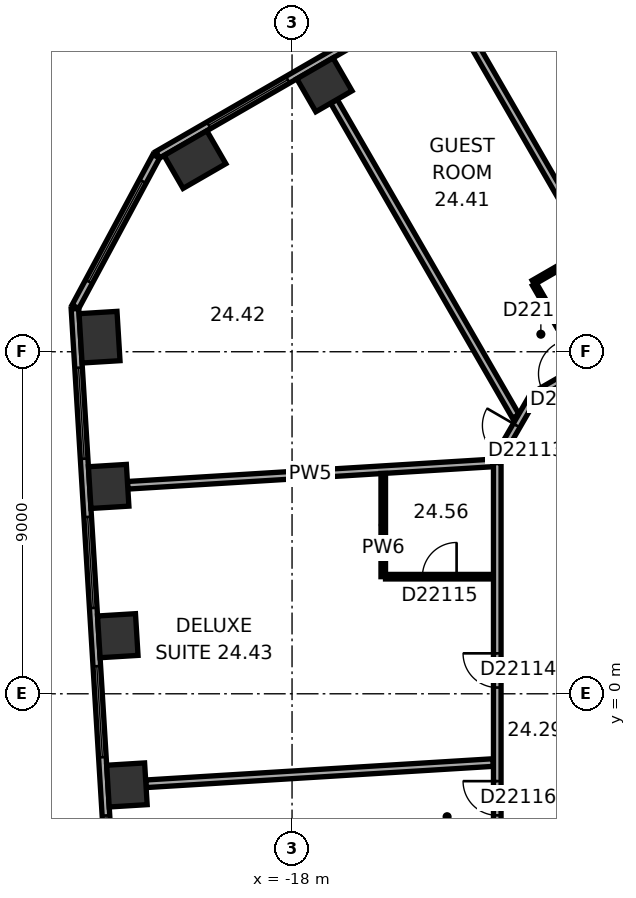
"""IFC4 building model, lengths in metres.
Left out: names, types, materials, properties, quantities, classifications, styles, units other than length and angle.
Written with IfcOpenShell. Run it as: python <this file> out.ifc"""

import sys

from ifc_helpers import new_model, si_unit, direction, frame, frame_2d, origin, origin_2d, place, context, subcontext, project, spatial, rectangle, extrude, element, fill, save


model = new_model("IFC4")
c1 = context("Model", 3, precision=1e-05, world=origin(), true_north=direction((0.0, 1.0)))
c2 = subcontext(c1, "Body", "Model", "MODEL_VIEW")
j1 = project(units=[si_unit("LENGTHUNIT", "METRE"), si_unit("PLANEANGLEUNIT", "RADIAN")], contexts=[c1])
p1 = place(None, origin())
s1 = spatial("IfcSite", under=j1, at=p1, CompositionType="ELEMENT")
p2 = place(p1, origin())
s2 = spatial("IfcBuilding", under=s1, at=p2, CompositionType="ELEMENT")
p3 = place(p2, frame((0.0, 0.0, 103.4)))
s3 = spatial("IfcBuildingStorey", under=s2, at=p3, CompositionType="ELEMENT", Elevation=103.4)
p4 = place(p3, frame((-17.148, 16.023, 0.0), z_axis=(0.0, 0.0, 1.0), x_axis=(-0.866025403784, -0.5, 0.0)))
e1 = element("IfcColumn", 1, at=p4, inside=s3, PredefinedType="COLUMN", context=c2, shape_type="SweptSolid", body=[
    extrude(rectangle(XDim=1.1, YDim=1.0, at=origin_2d()), origin(), (0.0, 0.0, 1.0), 3.3),
])
for number, where, z_axis, x_axis in (
    (2, (-20.555, 14.055, 0.0), (0.0, 0.0, 1.0), (-0.866, -0.5, 0.0)),
    (3, (-23.066, 9.383, 0.0), (0.0, 0.0, 1.0), (0.061, -0.998, 0.0)),
):
    element("IfcColumn", number, at=place(p3, frame(where, z_axis=z_axis, x_axis=x_axis)), inside=s3, PredefinedType="COLUMN", context=c2, shape_type="SweptSolid", body=[
        extrude(rectangle(XDim=1.3, YDim=1.0, at=origin_2d()), origin(), (0.0, 0.0, 1.0), 3.3),
    ])
for number, where, z_axis, x_axis in (
    (4, (-22.826, 5.456, 0.0), (0.0, 0.0, 1.0), (0.061, -0.998, 0.0)),
    (5, (-22.585, 1.529, 0.0), (0.0, 0.0, 1.0), (0.061, -0.998, 0.0)),
    (6, (-22.345, -2.399, 0.0), (0.0, 0.0, 1.0), (0.061, -0.998, 0.0)),
):
    element("IfcColumn", number, at=place(p3, frame(where, z_axis=z_axis, x_axis=x_axis)), inside=s3, PredefinedType="COLUMN", context=c2, shape_type="SweptSolid", body=[
        extrude(rectangle(XDim=1.1, YDim=1.0, at=origin_2d()), origin(), (0.0, 0.0, 1.0), 3.3),
    ])
p5 = place(p3, frame((-3.136, 24.805, 0.0), z_axis=(0.0, 0.0, 1.0), x_axis=(-0.866028291626, -0.499994998079, 0.0)))
e7 = element("IfcWall", 7, at=p5, inside=s3, PredefinedType="STANDARD", context=c2, shape_type="SweptSolid", body=[
    extrude(rectangle(XDim=21.246, YDim=0.2, at=frame_2d((10.623, 0.0))), origin(), (0.0, 0.0, 1.0), 3.3),
])
p6 = place(p5, frame((1.555, 0.0, 0.8)))
e8 = element("IfcOpeningElement", 8, at=p6, cuts=e7, PredefinedType="OPENING", context=c2, shape_type="SweptSolid", body=[
    extrude(rectangle(XDim=2.4, YDim=1.7, at=frame_2d((1.2, 0.85))), frame((0.0, 0.11, 0.0), z_axis=(0.0, -1.0, 0.0), x_axis=(1.0, 0.0, 0.0)), (0.0, 0.0, 1.0), 0.22),
])
p7 = place(p5, frame((5.489, 0.0, 0.8)))
e9 = element("IfcOpeningElement", 9, at=p7, cuts=e7, PredefinedType="OPENING", context=c2, shape_type="SweptSolid", body=[
    extrude(rectangle(XDim=2.4, YDim=1.7, at=frame_2d((1.2, 0.85))), frame((0.0, 0.11, 0.0), z_axis=(0.0, -1.0, 0.0), x_axis=(1.0, 0.0, 0.0)), (0.0, 0.0, 1.0), 0.22),
])
p8 = place(p5, frame((9.424, 0.0, 0.8)))
e10 = element("IfcOpeningElement", 10, at=p8, cuts=e7, PredefinedType="OPENING", context=c2, shape_type="SweptSolid", body=[
    extrude(rectangle(XDim=2.4, YDim=1.7, at=frame_2d((1.2, 0.85))), frame((0.0, 0.11, 0.0), z_axis=(0.0, -1.0, 0.0), x_axis=(1.0, 0.0, 0.0)), (0.0, 0.0, 1.0), 0.22),
])
p9 = place(p5, frame((13.358, 0.0, 0.8)))
e11 = element("IfcOpeningElement", 11, at=p9, cuts=e7, PredefinedType="OPENING", context=c2, shape_type="SweptSolid", body=[
    extrude(rectangle(XDim=2.4, YDim=1.7, at=frame_2d((1.2, 0.85))), frame((0.0, 0.11, 0.0), z_axis=(0.0, -1.0, 0.0), x_axis=(1.0, 0.0, 0.0)), (0.0, 0.0, 1.0), 0.22),
])
p10 = place(p5, frame((17.293, 0.0, 0.8)))
e12 = element("IfcOpeningElement", 12, at=p10, cuts=e7, PredefinedType="OPENING", context=c2, shape_type="SweptSolid", body=[
    extrude(rectangle(XDim=2.4, YDim=1.7, at=frame_2d((1.2, 0.85))), frame((0.0, 0.11, 0.0), z_axis=(0.0, -1.0, 0.0), x_axis=(1.0, 0.0, 0.0)), (0.0, 0.0, 1.0), 0.22),
])
p11 = place(p3, frame((-21.574, 14.143, 0.0), z_axis=(0.0, 0.0, 1.0), x_axis=(-0.473292949472, -0.880905093628, 0.0)))
e13 = element("IfcWall", 13, at=p11, inside=s3, PredefinedType="STANDARD", context=c2, shape_type="SweptSolid", body=[
    extrude(rectangle(XDim=4.494, YDim=0.2, at=frame_2d((2.247, 0.0))), origin(), (0.0, 0.0, 1.0), 3.3),
])
p12 = place(p11, frame((0.747, 0.0, 0.8)))
e14 = element("IfcOpeningElement", 14, at=p12, cuts=e13, PredefinedType="OPENING", context=c2, shape_type="SweptSolid", body=[
    extrude(rectangle(XDim=3.0, YDim=1.7, at=frame_2d((1.5, 0.85))), frame((0.0, 0.11, 0.0), z_axis=(0.0, -1.0, 0.0), x_axis=(1.0, 0.0, 0.0)), (0.0, 0.0, 1.0), 0.22),
])
p13 = place(p3, frame((-23.713, 10.131, 0.0), z_axis=(0.0, 0.0, 1.0), x_axis=(0.061040439785, -0.998135293791, 0.0)))
e15 = element("IfcWall", 15, at=p13, inside=s3, PredefinedType="STANDARD", context=c2, shape_type="SweptSolid", body=[
    extrude(rectangle(XDim=21.246, YDim=0.2, at=frame_2d((10.623, 0.0))), origin(), (0.0, 0.0, 1.0), 3.3),
])
p14 = place(p13, frame((1.553, 0.0, 0.8)))
e16 = element("IfcOpeningElement", 16, at=p14, cuts=e15, PredefinedType="OPENING", context=c2, shape_type="SweptSolid", body=[
    extrude(rectangle(XDim=2.4, YDim=1.7, at=frame_2d((1.2, 0.85))), frame((0.0, 0.11, 0.0), z_axis=(0.0, -1.0, 0.0), x_axis=(1.0, 0.0, 0.0)), (0.0, 0.0, 1.0), 0.22),
])
p15 = place(p13, frame((5.488, 0.0, 0.8)))
e17 = element("IfcOpeningElement", 17, at=p15, cuts=e15, PredefinedType="OPENING", context=c2, shape_type="SweptSolid", body=[
    extrude(rectangle(XDim=2.4, YDim=1.7, at=frame_2d((1.2, 0.85))), frame((0.0, 0.11, 0.0), z_axis=(0.0, -1.0, 0.0), x_axis=(1.0, 0.0, 0.0)), (0.0, 0.0, 1.0), 0.22),
])
p16 = place(p13, frame((9.422, 0.0, 0.8)))
e18 = element("IfcOpeningElement", 18, at=p16, cuts=e15, PredefinedType="OPENING", context=c2, shape_type="SweptSolid", body=[
    extrude(rectangle(XDim=2.4, YDim=1.7, at=frame_2d((1.2, 0.85))), frame((0.0, 0.11, 0.0), z_axis=(0.0, -1.0, 0.0), x_axis=(1.0, 0.0, 0.0)), (0.0, 0.0, 1.0), 0.22),
])
p17 = place(p13, frame((13.357, 0.0, 0.8)))
e19 = element("IfcOpeningElement", 19, at=p17, cuts=e15, PredefinedType="OPENING", context=c2, shape_type="SweptSolid", body=[
    extrude(rectangle(XDim=2.4, YDim=1.7, at=frame_2d((1.2, 0.85))), frame((0.0, 0.11, 0.0), z_axis=(0.0, -1.0, 0.0), x_axis=(1.0, 0.0, 0.0)), (0.0, 0.0, 1.0), 0.22),
])
p18 = place(p13, frame((17.292, 0.0, 0.8)))
e20 = element("IfcOpeningElement", 20, at=p18, cuts=e15, PredefinedType="OPENING", context=c2, shape_type="SweptSolid", body=[
    extrude(rectangle(XDim=2.4, YDim=1.7, at=frame_2d((1.2, 0.85))), frame((0.0, 0.11, 0.0), z_axis=(0.0, -1.0, 0.0), x_axis=(1.0, 0.0, 0.0)), (0.0, 0.0, 1.0), 0.22),
])
p19 = place(p3, frame((-22.327, 5.486, 0.0), z_axis=(0.0, 0.0, 1.0), x_axis=(0.998135194863, 0.061042057435, 0.0)))
e21 = element("IfcWall", 21, at=p19, inside=s3, PredefinedType="PARTITIONING", context=c2, shape_type="SweptSolid", body=[
    extrude(rectangle(XDim=9.635, YDim=0.2, at=frame_2d((4.817, 0.0))), origin(), (0.0, 0.0, 1.0), 3.05),
])
p20 = place(p3, frame((-21.846, -2.368, 0.0), z_axis=(0.0, 0.0, 1.0), x_axis=(0.998134617584, 0.061051496129, 0.0)))
e22 = element("IfcWall", 22, at=p20, inside=s3, PredefinedType="PARTITIONING", context=c2, shape_type="SweptSolid", body=[
    extrude(rectangle(XDim=9.154, YDim=0.2, at=frame_2d((4.577, 0.0))), origin(), (0.0, 0.0, 1.0), 3.05),
])
p21 = place(p3, frame((-16.898, 15.59, 0.0), z_axis=(0.0, 0.0, 1.0), x_axis=(0.500023458698, -0.866011859475, 0.0)))
e23 = element("IfcWall", 23, at=p21, inside=s3, PredefinedType="PARTITIONING", context=c2, shape_type="SweptSolid", body=[
    extrude(rectangle(XDim=9.572, YDim=0.2, at=frame_2d((4.786, 0.0))), origin(), (0.0, 0.0, 1.0), 3.05),
])
p22 = place(p3, frame((-15.6, 3.081, 0.0), z_axis=(0.0, 0.0, 1.0), x_axis=(0.0, 1.0, 0.0)))
e24 = element("IfcWall", 24, at=p22, inside=s3, PredefinedType="PARTITIONING", context=c2, shape_type="SweptSolid", body=[
    extrude(rectangle(XDim=2.716, YDim=0.12, at=frame_2d((1.358, 0.0))), origin(), (0.0, 0.0, 1.0), 3.05),
])
p23 = place(p3, frame((-12.7, 3.081, 0.0), z_axis=(0.0, 0.0, 1.0), x_axis=(-1.0, 0.0, 0.0)))
e25 = element("IfcWall", 25, at=p23, inside=s3, PredefinedType="PARTITIONING", context=c2, shape_type="SweptSolid", body=[
    extrude(rectangle(XDim=2.84, YDim=0.12, at=frame_2d((1.42, 0.0))), origin(), (0.0, 0.0, 1.0), 3.05),
])
p24 = place(p23, frame((0.97, 0.0, 0.0)))
e26 = element("IfcOpeningElement", 26, at=p24, cuts=e25, PredefinedType="OPENING", context=c2, shape_type="SweptSolid", body=[
    extrude(rectangle(XDim=0.9, YDim=2.1, at=frame_2d((0.45, 1.05))), frame((0.0, 0.07, 0.0), z_axis=(0.0, -1.0, 0.0), x_axis=(1.0, 0.0, 0.0)), (0.0, 0.0, 1.0), 0.14),
])
p25 = place(p3, frame((-12.6, 6.081, 0.0), z_axis=(0.0, 0.0, 1.0), x_axis=(0.0, -1.0, 0.0)))
e27 = element("IfcWall", 27, at=p25, inside=s3, PredefinedType="PARTITIONING", context=c2, shape_type="SweptSolid", body=[
    extrude(rectangle(XDim=12.219, YDim=0.2, at=frame_2d((6.109, 0.0))), origin(), (0.0, 0.0, 1.0), 3.05),
])
p26 = place(p25, frame((5.017, 0.0, 0.0)))
e28 = element("IfcOpeningElement", 28, at=p26, cuts=e27, PredefinedType="OPENING", context=c2, shape_type="SweptSolid", body=[
    extrude(rectangle(XDim=0.9, YDim=2.1, at=frame_2d((0.45, 1.05))), frame((0.0, 0.11, 0.0), z_axis=(0.0, -1.0, 0.0), x_axis=(1.0, 0.0, 0.0)), (0.0, 0.0, 1.0), 0.22),
])
p27 = place(p25, frame((8.38, 0.0, 0.0)))
e29 = element("IfcOpeningElement", 29, at=p27, cuts=e27, PredefinedType="OPENING", context=c2, shape_type="SweptSolid", body=[
    extrude(rectangle(XDim=0.9, YDim=2.1, at=frame_2d((0.45, 1.05))), frame((0.0, 0.11, 0.0), z_axis=(0.0, -1.0, 0.0), x_axis=(1.0, 0.0, 0.0)), (0.0, 0.0, 1.0), 0.22),
])
p28 = place(p3, frame((-11.65, 7.823, 0.0), z_axis=(0.0, 0.0, 1.0), x_axis=(-0.500063520245, -0.865988727248, 0.0)))
e30 = element("IfcWall", 30, at=p28, inside=s3, PredefinedType="PARTITIONING", context=c2, shape_type="SweptSolid", body=[
    extrude(rectangle(XDim=1.9, YDim=0.2, at=frame_2d((0.95, 0.0))), origin(), (0.0, 0.0, 1.0), 3.05),
])
p29 = place(p28, frame((0.882, 0.0, 0.0)))
e31 = element("IfcOpeningElement", 31, at=p29, cuts=e30, PredefinedType="OPENING", context=c2, shape_type="SweptSolid", body=[
    extrude(rectangle(XDim=0.9, YDim=2.1, at=frame_2d((0.45, 1.05))), frame((0.0, 0.11, 0.0), z_axis=(0.0, -1.0, 0.0), x_axis=(1.0, 0.0, 0.0)), (0.0, 0.0, 1.0), 0.22),
])
p30 = place(p3, frame((-11.651, 10.825, 0.0), z_axis=(0.0, 0.0, 1.0), x_axis=(0.865998477143, 0.500046635412, 0.0)))
e32 = element("IfcWall", 32, at=p30, inside=s3, PredefinedType="PARTITIONING", context=c2, shape_type="SweptSolid", body=[
    extrude(rectangle(XDim=1.673, YDim=0.12, at=frame_2d((0.836, 0.0))), origin(), (0.0, 0.0, 1.0), 3.05),
])
p31 = place(p3, frame((-10.401, 8.66, 0.0), z_axis=(0.0, 0.0, 1.0), x_axis=(-0.500077547548, 0.865980627057, 0.0)))
e33 = element("IfcWall", 33, at=p31, inside=s3, PredefinedType="PARTITIONING", context=c2, shape_type="SweptSolid", body=[
    extrude(rectangle(XDim=2.44, YDim=0.12, at=frame_2d((1.22, 0.0))), origin(), (0.0, 0.0, 1.0), 3.05),
])
p32 = place(p31, frame((0.77, 0.0, 0.0)))
e34 = element("IfcOpeningElement", 34, at=p32, cuts=e33, PredefinedType="OPENING", context=c2, shape_type="SweptSolid", body=[
    extrude(rectangle(XDim=0.9, YDim=2.1, at=frame_2d((0.45, 1.05))), frame((0.0, 0.07, 0.0), z_axis=(0.0, -1.0, 0.0), x_axis=(1.0, 0.0, 0.0)), (0.0, 0.0, 1.0), 0.14),
])
p33 = place(p3, frame((-8.902, 9.41, 0.0), z_axis=(0.0, 0.0, 1.0), x_axis=(-0.866014299198, -0.500019233215, 0.0)))
e35 = element("IfcWall", 35, at=p33, inside=s3, PredefinedType="PARTITIONING", context=c2, shape_type="SweptSolid", body=[
    extrude(rectangle(XDim=3.133, YDim=0.2, at=frame_2d((1.567, 0.0))), origin(), (0.0, 0.0, 1.0), 3.05),
])
p34 = place(p33, frame((1.978, 0.0, 0.0)))
e36 = element("IfcOpeningElement", 36, at=p34, cuts=e35, PredefinedType="OPENING", context=c2, shape_type="SweptSolid", body=[
    extrude(rectangle(XDim=0.9, YDim=2.1, at=frame_2d((0.45, 1.05))), frame((0.0, 0.11, 0.0), z_axis=(0.0, -1.0, 0.0), x_axis=(1.0, 0.0, 0.0)), (0.0, 0.0, 1.0), 0.22),
])
p35 = place(p3, frame((-7.865, 7.814, 0.0), z_axis=(0.0, 0.0, 1.0), x_axis=(-0.500004234368, 0.866022959057, 0.0)))
e37 = element("IfcWall", 37, at=p35, inside=s3, PredefinedType="PARTITIONING", context=c2, shape_type="SweptSolid", body=[
    extrude(rectangle(XDim=11.25, YDim=0.2, at=frame_2d((5.625, 0.0))), origin(), (0.0, 0.0, 1.0), 3.05),
])
p36 = place(p35, frame((0.5, 0.0, 0.0)))
e38 = element("IfcOpeningElement", 38, at=p36, cuts=e37, PredefinedType="OPENING", context=c2, shape_type="SweptSolid", body=[
    extrude(rectangle(XDim=0.9, YDim=2.1, at=frame_2d((0.45, 1.05))), frame((0.0, 0.11, 0.0), z_axis=(0.0, -1.0, 0.0), x_axis=(1.0, 0.0, 0.0)), (0.0, 0.0, 1.0), 0.22),
])
p37 = place(p10, origin())
e39 = element("IfcWindow", 39, at=p37, inside=s3, PartitioningType="SINGLE_PANEL", PredefinedType="WINDOW", context=c2, shape_type="SweptSolid", body=[
    extrude(rectangle(XDim=2.4, YDim=1.7, at=frame_2d((1.2, 0.85))), frame((0.0, 0.03, 0.0), z_axis=(0.0, -1.0, 0.0), x_axis=(1.0, 0.0, 0.0)), (0.0, 0.0, 1.0), 0.06),
])
fill(e12, e39)
p38 = place(p12, origin())
e40 = element("IfcWindow", 40, at=p38, inside=s3, PartitioningType="SINGLE_PANEL", PredefinedType="WINDOW", context=c2, shape_type="SweptSolid", body=[
    extrude(rectangle(XDim=3.0, YDim=1.7, at=frame_2d((1.5, 0.85))), frame((0.0, 0.03, 0.0), z_axis=(0.0, -1.0, 0.0), x_axis=(1.0, 0.0, 0.0)), (0.0, 0.0, 1.0), 0.06),
])
fill(e14, e40)
p39 = place(p14, origin())
e41 = element("IfcWindow", 41, at=p39, inside=s3, PartitioningType="SINGLE_PANEL", PredefinedType="WINDOW", context=c2, shape_type="SweptSolid", body=[
    extrude(rectangle(XDim=2.4, YDim=1.7, at=frame_2d((1.2, 0.85))), frame((0.0, 0.03, 0.0), z_axis=(0.0, -1.0, 0.0), x_axis=(1.0, 0.0, 0.0)), (0.0, 0.0, 1.0), 0.06),
])
fill(e16, e41)
p40 = place(p15, origin())
e42 = element("IfcWindow", 42, at=p40, inside=s3, PartitioningType="SINGLE_PANEL", PredefinedType="WINDOW", context=c2, shape_type="SweptSolid", body=[
    extrude(rectangle(XDim=2.4, YDim=1.7, at=frame_2d((1.2, 0.85))), frame((0.0, 0.03, 0.0), z_axis=(0.0, -1.0, 0.0), x_axis=(1.0, 0.0, 0.0)), (0.0, 0.0, 1.0), 0.06),
])
fill(e17, e42)
p41 = place(p16, origin())
e43 = element("IfcWindow", 43, at=p41, inside=s3, PartitioningType="SINGLE_PANEL", PredefinedType="WINDOW", context=c2, shape_type="SweptSolid", body=[
    extrude(rectangle(XDim=2.4, YDim=1.7, at=frame_2d((1.2, 0.85))), frame((0.0, 0.03, 0.0), z_axis=(0.0, -1.0, 0.0), x_axis=(1.0, 0.0, 0.0)), (0.0, 0.0, 1.0), 0.06),
])
fill(e18, e43)
p42 = place(p17, origin())
e44 = element("IfcWindow", 44, at=p42, inside=s3, PartitioningType="SINGLE_PANEL", PredefinedType="WINDOW", context=c2, shape_type="SweptSolid", body=[
    extrude(rectangle(XDim=2.4, YDim=1.7, at=frame_2d((1.2, 0.85))), frame((0.0, 0.03, 0.0), z_axis=(0.0, -1.0, 0.0), x_axis=(1.0, 0.0, 0.0)), (0.0, 0.0, 1.0), 0.06),
])
fill(e19, e44)
p43 = place(p34, origin())
e45 = element("IfcDoor", 45, at=p43, inside=s3, OperationType="SINGLE_SWING_LEFT", PredefinedType="DOOR", context=c2, shape_type="SweptSolid", body=[
    extrude(rectangle(XDim=0.9, YDim=2.1, at=frame_2d((0.45, 1.05))), frame((0.0, 0.025, 0.0), z_axis=(0.0, -1.0, 0.0), x_axis=(1.0, 0.0, 0.0)), (0.0, 0.0, 1.0), 0.05),
])
fill(e36, e45)
p44 = place(p32, origin())
e46 = element("IfcDoor", 46, at=p44, inside=s3, OperationType="SINGLE_SWING_LEFT", PredefinedType="DOOR", context=c2, shape_type="SweptSolid", body=[
    extrude(rectangle(XDim=0.9, YDim=2.1, at=frame_2d((0.45, 1.05))), frame((0.0, 0.025, 0.0), z_axis=(0.0, -1.0, 0.0), x_axis=(1.0, 0.0, 0.0)), (0.0, 0.0, 1.0), 0.05),
])
fill(e34, e46)
p45 = place(p29, origin())
e47 = element("IfcDoor", 47, at=p45, inside=s3, OperationType="SINGLE_SWING_LEFT", PredefinedType="DOOR", context=c2, shape_type="SweptSolid", body=[
    extrude(rectangle(XDim=0.9, YDim=2.1, at=frame_2d((0.45, 1.05))), frame((0.0, 0.025, 0.0), z_axis=(0.0, -1.0, 0.0), x_axis=(1.0, 0.0, 0.0)), (0.0, 0.0, 1.0), 0.05),
])
fill(e31, e47)
p46 = place(p26, origin())
e48 = element("IfcDoor", 48, at=p46, inside=s3, OperationType="SINGLE_SWING_LEFT", PredefinedType="DOOR", context=c2, shape_type="SweptSolid", body=[
    extrude(rectangle(XDim=0.9, YDim=2.1, at=frame_2d((0.45, 1.05))), frame((0.0, 0.025, 0.0), z_axis=(0.0, -1.0, 0.0), x_axis=(1.0, 0.0, 0.0)), (0.0, 0.0, 1.0), 0.05),
])
fill(e28, e48)
p47 = place(p24, origin())
e49 = element("IfcDoor", 49, at=p47, inside=s3, OperationType="SINGLE_SWING_LEFT", PredefinedType="DOOR", context=c2, shape_type="SweptSolid", body=[
    extrude(rectangle(XDim=0.9, YDim=2.1, at=frame_2d((0.45, 1.05))), frame((0.0, 0.025, 0.0), z_axis=(0.0, -1.0, 0.0), x_axis=(1.0, 0.0, 0.0)), (0.0, 0.0, 1.0), 0.05),
])
fill(e26, e49)
p48 = place(p27, origin())
e50 = element("IfcDoor", 50, at=p48, inside=s3, OperationType="SINGLE_SWING_LEFT", PredefinedType="DOOR", context=c2, shape_type="SweptSolid", body=[
    extrude(rectangle(XDim=0.9, YDim=2.1, at=frame_2d((0.45, 1.05))), frame((0.0, 0.025, 0.0), z_axis=(0.0, -1.0, 0.0), x_axis=(1.0, 0.0, 0.0)), (0.0, 0.0, 1.0), 0.05),
])
fill(e29, e50)
save(model, sys.argv[1])
